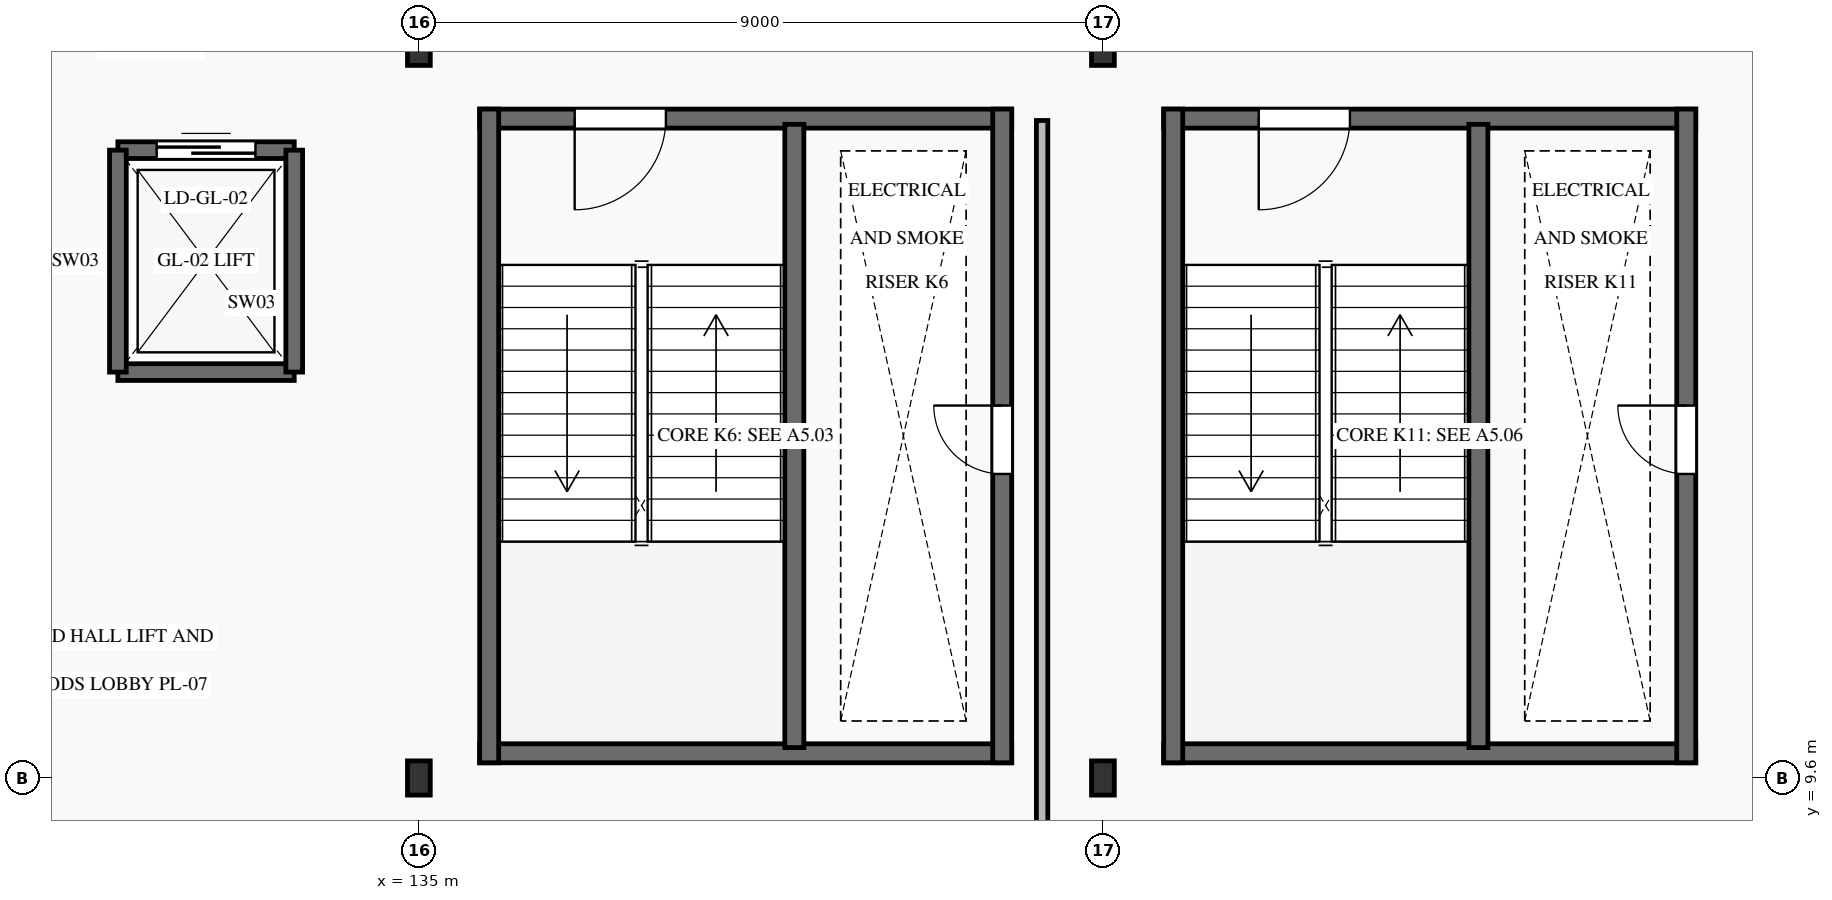
"""IFC4 building model, lengths in metres.
Left out: names, types, materials, properties, quantities, classifications, styles, units other than length and angle.
Written with IfcOpenShell. Run it as: python <this file> out.ifc"""

import sys

from ifc_helpers import new_model, si_unit, direction, frame, frame_2d, origin, origin_2d, place, context, subcontext, project, spatial, rectangle, i_section, extrude, element, fill, save


model = new_model("IFC4")
c1 = context("Model", 3, precision=1e-05, world=origin(), true_north=direction((0.0, 1.0)))
c2 = subcontext(c1, "Body", "Model", "MODEL_VIEW")
j1 = project(units=[si_unit("LENGTHUNIT", "METRE"), si_unit("PLANEANGLEUNIT", "RADIAN")], contexts=[c1])
p1 = place(None, origin())
s1 = spatial("IfcSite", under=j1, at=p1, CompositionType="ELEMENT")
p2 = place(p1, origin())
s2 = spatial("IfcBuilding", under=s1, at=p2, CompositionType="ELEMENT")
p3 = place(p2, frame((0.0, 0.0, 6.0)))
s3 = spatial("IfcBuildingStorey", under=s2, at=p3, CompositionType="ELEMENT", Elevation=6.0)
for number, where, z_axis, x_axis in (
    (1, (135.0, 9.6, 0.0), (0.0, 0.0, 1.0), (1.0, 0.0, 0.0)),
    (2, (135.0, 19.2, 0.0), (0.0, 0.0, 1.0), (1.0, 0.0, 0.0)),
    (3, (144.0, 9.6, 0.0), (0.0, 0.0, 1.0), (1.0, 0.0, 0.0)),
    (4, (144.0, 19.2, 0.0), (0.0, 0.0, 1.0), (1.0, 0.0, 0.0)),
):
    element("IfcColumn", number, at=place(p3, frame(where, z_axis=z_axis, x_axis=x_axis)), inside=s3, PredefinedType="COLUMN", context=c2, shape_type="SweptSolid", body=[
        extrude(i_section(OverallWidth=0.3, OverallDepth=0.45, WebThickness=0.014, FlangeThickness=0.026, FilletRadius=0.027, at=origin_2d()), origin(), (0.0, 0.0, 1.0), 4.8),
    ])
p4 = place(p3, frame((135.8, 9.925, 0.0), z_axis=(0.0, 0.0, 1.0), x_axis=(1.0, 0.0, 0.0)))
e5 = element("IfcWall", 5, at=p4, inside=s3, PredefinedType="SHEAR", context=c2, shape_type="SweptSolid", body=[
    extrude(rectangle(XDim=7.0, YDim=0.25, at=frame_2d((3.5, 0.0))), origin(), (0.0, 0.0, 1.0), 4.8),
])
p5 = place(p3, frame((135.8, 18.275, 0.0), z_axis=(0.0, 0.0, 1.0), x_axis=(1.0, 0.0, 0.0)))
e6 = element("IfcWall", 6, at=p5, inside=s3, PredefinedType="SHEAR", context=c2, shape_type="SweptSolid", body=[
    extrude(rectangle(XDim=7.0, YDim=0.25, at=frame_2d((3.5, 0.0))), origin(), (0.0, 0.0, 1.0), 4.8),
])
p6 = place(p5, frame((1.25, 0.0, 0.0)))
e7 = element("IfcOpeningElement", 7, at=p6, cuts=e6, PredefinedType="OPENING", context=c2, shape_type="SweptSolid", body=[
    extrude(rectangle(XDim=1.2, YDim=2.15, at=frame_2d((0.6, 1.075))), frame((0.0, 0.14, 0.0), z_axis=(0.0, -1.0, 0.0), x_axis=(1.0, 0.0, 0.0)), (0.0, 0.0, 1.0), 0.28),
])
p7 = place(p3, frame((135.925, 9.8, 0.0), z_axis=(0.0, 0.0, 1.0), x_axis=(0.0, 1.0, 0.0)))
e8 = element("IfcWall", 8, at=p7, inside=s3, PredefinedType="SHEAR", context=c2, shape_type="SweptSolid", body=[
    extrude(rectangle(XDim=8.6, YDim=0.25, at=frame_2d((4.3, 0.0))), origin(), (0.0, 0.0, 1.0), 4.8),
])
p8 = place(p3, frame((142.675, 9.8, 0.0), z_axis=(0.0, 0.0, 1.0), x_axis=(0.0, 1.0, 0.0)))
e9 = element("IfcWall", 9, at=p8, inside=s3, PredefinedType="SHEAR", context=c2, shape_type="SweptSolid", body=[
    extrude(rectangle(XDim=8.6, YDim=0.25, at=frame_2d((4.3, 0.0))), origin(), (0.0, 0.0, 1.0), 4.8),
])
p9 = place(p8, frame((3.8, 0.0, 0.0)))
e10 = element("IfcOpeningElement", 10, at=p9, cuts=e9, PredefinedType="OPENING", context=c2, shape_type="SweptSolid", body=[
    extrude(rectangle(XDim=0.9, YDim=2.05, at=frame_2d((0.45, 1.025))), frame((0.0, 0.14, 0.0), z_axis=(0.0, -1.0, 0.0), x_axis=(1.0, 0.0, 0.0)), (0.0, 0.0, 1.0), 0.28),
])
p10 = place(p3, frame((139.94, 10.0, 0.0), z_axis=(0.0, 0.0, 1.0), x_axis=(0.0, 1.0, 0.0)))
e11 = element("IfcWall", 11, at=p10, inside=s3, PredefinedType="SHEAR", context=c2, shape_type="SweptSolid", body=[
    extrude(rectangle(XDim=8.2, YDim=0.25, at=frame_2d((4.1, 0.0))), origin(), (0.0, 0.0, 1.0), 4.8),
])
p11 = place(p3, frame((144.8, 9.925, 0.0), z_axis=(0.0, 0.0, 1.0), x_axis=(1.0, 0.0, 0.0)))
e12 = element("IfcWall", 12, at=p11, inside=s3, PredefinedType="SHEAR", context=c2, shape_type="SweptSolid", body=[
    extrude(rectangle(XDim=7.0, YDim=0.25, at=frame_2d((3.5, 0.0))), origin(), (0.0, 0.0, 1.0), 4.8),
])
p12 = place(p3, frame((144.8, 18.275, 0.0), z_axis=(0.0, 0.0, 1.0), x_axis=(1.0, 0.0, 0.0)))
e13 = element("IfcWall", 13, at=p12, inside=s3, PredefinedType="SHEAR", context=c2, shape_type="SweptSolid", body=[
    extrude(rectangle(XDim=7.0, YDim=0.25, at=frame_2d((3.5, 0.0))), origin(), (0.0, 0.0, 1.0), 4.8),
])
p13 = place(p12, frame((1.25, 0.0, 0.0)))
e14 = element("IfcOpeningElement", 14, at=p13, cuts=e13, PredefinedType="OPENING", context=c2, shape_type="SweptSolid", body=[
    extrude(rectangle(XDim=1.2, YDim=2.15, at=frame_2d((0.6, 1.075))), frame((0.0, 0.14, 0.0), z_axis=(0.0, -1.0, 0.0), x_axis=(1.0, 0.0, 0.0)), (0.0, 0.0, 1.0), 0.28),
])
p14 = place(p3, frame((144.925, 9.8, 0.0), z_axis=(0.0, 0.0, 1.0), x_axis=(0.0, 1.0, 0.0)))
e15 = element("IfcWall", 15, at=p14, inside=s3, PredefinedType="SHEAR", context=c2, shape_type="SweptSolid", body=[
    extrude(rectangle(XDim=8.6, YDim=0.25, at=frame_2d((4.3, 0.0))), origin(), (0.0, 0.0, 1.0), 4.8),
])
p15 = place(p3, frame((151.675, 9.8, 0.0), z_axis=(0.0, 0.0, 1.0), x_axis=(0.0, 1.0, 0.0)))
e16 = element("IfcWall", 16, at=p15, inside=s3, PredefinedType="SHEAR", context=c2, shape_type="SweptSolid", body=[
    extrude(rectangle(XDim=8.6, YDim=0.25, at=frame_2d((4.3, 0.0))), origin(), (0.0, 0.0, 1.0), 4.8),
])
p16 = place(p15, frame((3.8, 0.0, 0.0)))
e17 = element("IfcOpeningElement", 17, at=p16, cuts=e16, PredefinedType="OPENING", context=c2, shape_type="SweptSolid", body=[
    extrude(rectangle(XDim=0.9, YDim=2.05, at=frame_2d((0.45, 1.025))), frame((0.0, 0.14, 0.0), z_axis=(0.0, -1.0, 0.0), x_axis=(1.0, 0.0, 0.0)), (0.0, 0.0, 1.0), 0.28),
])
p17 = place(p3, frame((148.94, 10.0, 0.0), z_axis=(0.0, 0.0, 1.0), x_axis=(0.0, 1.0, 0.0)))
e18 = element("IfcWall", 18, at=p17, inside=s3, PredefinedType="SHEAR", context=c2, shape_type="SweptSolid", body=[
    extrude(rectangle(XDim=8.2, YDim=0.25, at=frame_2d((4.1, 0.0))), origin(), (0.0, 0.0, 1.0), 4.8),
])
p18 = place(p3, frame((131.04, 14.94, 0.0), z_axis=(0.0, 0.0, 1.0), x_axis=(1.0, 0.0, 0.0)))
e19 = element("IfcWall", 19, at=p18, inside=s3, PredefinedType="SHEAR", context=c2, shape_type="SweptSolid", body=[
    extrude(rectangle(XDim=2.32, YDim=0.22, at=frame_2d((1.16, 0.0))), origin(), (0.0, 0.0, 1.0), 4.8),
])
p19 = place(p3, frame((131.04, 17.86, 0.0), z_axis=(0.0, 0.0, 1.0), x_axis=(1.0, 0.0, 0.0)))
e20 = element("IfcWall", 20, at=p19, inside=s3, PredefinedType="SHEAR", context=c2, shape_type="SweptSolid", body=[
    extrude(rectangle(XDim=2.32, YDim=0.22, at=frame_2d((1.16, 0.0))), origin(), (0.0, 0.0, 1.0), 4.8),
])
p20 = place(p19, frame((0.51, 0.0, 0.0)))
e21 = element("IfcOpeningElement", 21, at=p20, cuts=e20, PredefinedType="OPENING", context=c2, shape_type="SweptSolid", body=[
    extrude(rectangle(XDim=1.3, YDim=2.25, at=frame_2d((0.65, 1.125))), frame((0.0, 0.125, 0.0), z_axis=(0.0, -1.0, 0.0), x_axis=(1.0, 0.0, 0.0)), (0.0, 0.0, 1.0), 0.25),
])
for number, where, z_axis, x_axis in (
    (22, (131.04, 14.94, 0.0), (0.0, 0.0, 1.0), (0.0, 1.0, 0.0)),
    (23, (133.36, 14.94, 0.0), (0.0, 0.0, 1.0), (0.0, 1.0, 0.0)),
):
    element("IfcWall", number, at=place(p3, frame(where, z_axis=z_axis, x_axis=x_axis)), inside=s3, PredefinedType="SHEAR", context=c2, shape_type="SweptSolid", body=[
        extrude(rectangle(XDim=2.92, YDim=0.22, at=frame_2d((1.46, 0.0))), origin(), (0.0, 0.0, 1.0), 4.8),
    ])
p21 = place(p3, frame((143.2, 0.385, 0.0), z_axis=(0.0, 0.0, 1.0), x_axis=(0.0, 1.0, 0.0)))
e24 = element("IfcWall", 24, at=p21, inside=s3, PredefinedType="PARTITIONING", context=c2, shape_type="SweptSolid", body=[
    extrude(rectangle(XDim=17.865, YDim=0.15, at=frame_2d((8.933, 0.0))), origin(), (0.0, 0.0, 1.0), 4.53),
])
p22 = place(p21, frame((6.115, 0.0, 0.0)))
e25 = element("IfcOpeningElement", 25, at=p22, cuts=e24, PredefinedType="OPENING", context=c2, shape_type="SweptSolid", body=[
    extrude(rectangle(XDim=1.6, YDim=2.25, at=frame_2d((0.8, 1.125))), frame((0.0, 0.09, 0.0), z_axis=(0.0, -1.0, 0.0), x_axis=(1.0, 0.0, 0.0)), (0.0, 0.0, 1.0), 0.18),
])
p23 = place(p6, frame((1.2, 0.0, 0.0), z_axis=(0.0, 0.0, 1.0), x_axis=(-1.0, 0.0, 0.0)))
e26 = element("IfcDoor", 26, at=p23, inside=s3, OperationType="SINGLE_SWING_LEFT", PredefinedType="DOOR", context=c2, shape_type="SweptSolid", body=[
    extrude(rectangle(XDim=1.2, YDim=2.15, at=frame_2d((0.6, 1.075))), frame((0.0, 0.025, 0.0), z_axis=(0.0, -1.0, 0.0), x_axis=(1.0, 0.0, 0.0)), (0.0, 0.0, 1.0), 0.05),
])
fill(e7, e26)
p24 = place(p9, origin())
e27 = element("IfcDoor", 27, at=p24, inside=s3, OperationType="SINGLE_SWING_RIGHT", PredefinedType="DOOR", context=c2, shape_type="SweptSolid", body=[
    extrude(rectangle(XDim=0.9, YDim=2.05, at=frame_2d((0.45, 1.025))), frame((0.0, 0.025, 0.0), z_axis=(0.0, -1.0, 0.0), x_axis=(1.0, 0.0, 0.0)), (0.0, 0.0, 1.0), 0.05),
])
fill(e10, e27)
p25 = place(p13, frame((1.2, 0.0, 0.0), z_axis=(0.0, 0.0, 1.0), x_axis=(-1.0, 0.0, 0.0)))
e28 = element("IfcDoor", 28, at=p25, inside=s3, OperationType="SINGLE_SWING_LEFT", PredefinedType="DOOR", context=c2, shape_type="SweptSolid", body=[
    extrude(rectangle(XDim=1.2, YDim=2.15, at=frame_2d((0.6, 1.075))), frame((0.0, 0.025, 0.0), z_axis=(0.0, -1.0, 0.0), x_axis=(1.0, 0.0, 0.0)), (0.0, 0.0, 1.0), 0.05),
])
fill(e14, e28)
p26 = place(p16, origin())
e29 = element("IfcDoor", 29, at=p26, inside=s3, OperationType="SINGLE_SWING_RIGHT", PredefinedType="DOOR", context=c2, shape_type="SweptSolid", body=[
    extrude(rectangle(XDim=0.9, YDim=2.05, at=frame_2d((0.45, 1.025))), frame((0.0, 0.025, 0.0), z_axis=(0.0, -1.0, 0.0), x_axis=(1.0, 0.0, 0.0)), (0.0, 0.0, 1.0), 0.05),
])
fill(e17, e29)
p27 = place(p20, origin())
e30 = element("IfcDoor", 30, at=p27, inside=s3, OperationType="SLIDING_TO_RIGHT", PredefinedType="DOOR", context=c2, shape_type="SweptSolid", body=[
    extrude(rectangle(XDim=1.3, YDim=2.25, at=frame_2d((0.65, 1.125))), frame((0.0, 0.025, 0.0), z_axis=(0.0, -1.0, 0.0), x_axis=(1.0, 0.0, 0.0)), (0.0, 0.0, 1.0), 0.05),
])
fill(e21, e30)
save(model, sys.argv[1])
